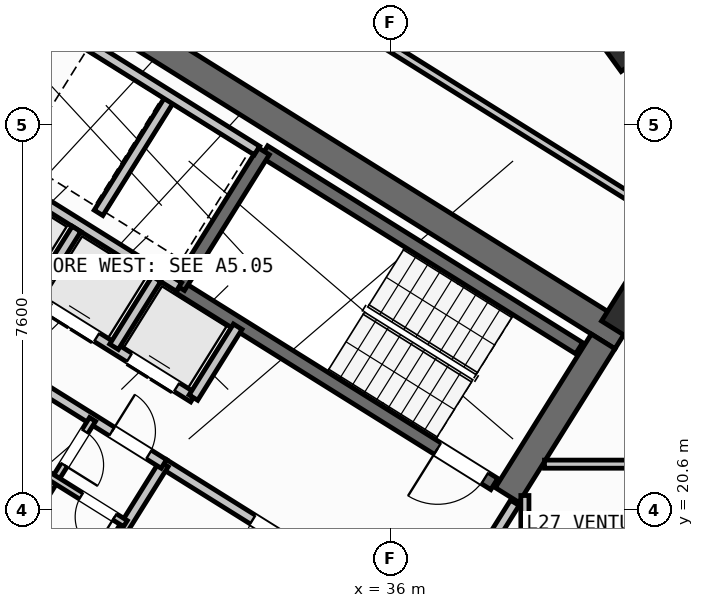
"""IFC4 building model, lengths in metres.
Left out: names, types, materials, properties, quantities, classifications, styles, units other than length and angle.
Written with IfcOpenShell. Run it as: python <this file> out.ifc"""

import sys

from ifc_helpers import new_model, si_unit, direction, frame, frame_2d, origin, origin_2d, place, context, subcontext, project, spatial, rectangle, hollow_rectangle, i_section, extrude, source, transform, mapped, element, fill, save


model = new_model("IFC4")
c1 = context("Model", 3, precision=1e-05, world=origin(), true_north=direction((0.0, 1.0)))
c2 = subcontext(c1, "Body", "Model", "MODEL_VIEW")
j1 = project(units=[si_unit("LENGTHUNIT", "METRE"), si_unit("PLANEANGLEUNIT", "RADIAN")], contexts=[c1])
p1 = place(None, origin())
s1 = spatial("IfcSite", under=j1, at=p1, CompositionType="ELEMENT")
p2 = place(p1, origin())
s2 = spatial("IfcBuilding", under=s1, at=p2, CompositionType="ELEMENT")
p3 = place(p2, frame((0.0, 0.0, 108.9)))
s3 = spatial("IfcBuildingStorey", under=s2, at=p3, CompositionType="ELEMENT", Elevation=108.9)
p4 = place(p3, frame((40.573, 24.01, 0.0), z_axis=(0.0, 0.0, 1.0), x_axis=(-0.848047359947, 0.529920442413, 0.0)))
e1 = element("IfcWall", 1, at=p4, inside=s3, PredefinedType="SHEAR", context=c2, shape_type="SweptSolid", body=[
    extrude(rectangle(XDim=13.14, YDim=0.55, at=frame_2d((6.57, 0.0))), origin(), (0.0, 0.0, 1.0), 3.35),
])
p5 = place(p3, frame((40.194, 23.922, 0.0), z_axis=(0.0, 0.0, 1.0), x_axis=(-0.529888438328, -0.848067357541, 0.0)))
e2 = element("IfcWall", 2, at=p5, inside=s3, PredefinedType="SHEAR", context=c2, shape_type="SweptSolid", body=[
    extrude(rectangle(XDim=3.575, YDim=0.55, at=frame_2d((1.788, 0.0))), origin(), (0.0, 0.0, 1.0), 3.35),
])
p6 = place(p3, frame((29.517, 30.594, 0.0), z_axis=(0.0, 0.0, 1.0), x_axis=(-0.529906864564, -0.848055844204, 0.0)))
e3 = element("IfcWall", 3, at=p6, inside=s3, PredefinedType="SHEAR", context=c2, shape_type="SweptSolid", body=[
    extrude(rectangle(XDim=3.575, YDim=0.55, at=frame_2d((1.788, 0.0))), origin(), (0.0, 0.0, 1.0), 3.35),
])
m1 = source(origin(), c2, "Body", "SweptSolid", [
    extrude(hollow_rectangle(XDim=0.9, YDim=0.9, WallThickness=0.036, at=origin_2d()), origin(), (0.0, 0.0, 1.0), 3.6),
])
p7 = place(p3, frame((40.783, 24.469, 0.0), z_axis=(0.0, 0.0, 1.0), x_axis=(-0.848048096156, 0.529919264233, 0.0)))
e4 = element("IfcColumn", 4, at=p7, inside=s3, PredefinedType="COLUMN", context=c2, shape_type="MappedRepresentation", body=[
    mapped(m1, transform((0.0, 0.0, 0.0), scale=1.0)),
])
m2 = source(origin(), c2, "Body", "SweptSolid", [
    extrude(i_section(OverallWidth=0.3, OverallDepth=0.65, WebThickness=0.016, FlangeThickness=0.031, at=origin_2d()), origin(), (0.0, 0.0, 1.0), 3.6),
])
p8 = place(p3, frame((40.479, 29.601, 0.0), z_axis=(0.0, 0.0, 1.0), x_axis=(0.809016994375, 0.587785252292, 0.0)))
e5 = element("IfcColumn", 5, at=p8, inside=s3, PredefinedType="COLUMN", context=c2, shape_type="MappedRepresentation", body=[
    mapped(m2, transform((0.0, 0.0, 0.0), scale=1.0)),
])
p9 = place(p3, frame((31.76, 12.183, 0.0), z_axis=(0.0, 0.0, 1.0), x_axis=(-0.848047074256, 0.529920899612, 0.0)))
e6 = element("IfcWall", 6, at=p9, inside=s3, PredefinedType="STANDARD", context=c2, shape_type="SweptSolid", body=[
    extrude(rectangle(XDim=30.652, YDim=0.32, at=frame_2d((15.326, 0.0))), origin(), (0.0, 0.0, 1.0), 3.35),
])
p10 = place(p9, frame((15.153, 0.0, 0.0)))
e7 = element("IfcOpeningElement", 7, at=p10, cuts=e6, PredefinedType="OPENING", context=c2, shape_type="SweptSolid", body=[
    extrude(rectangle(XDim=1.2, YDim=2.15, at=frame_2d((0.6, 1.075))), frame((0.0, 0.17, 0.0), z_axis=(0.0, -1.0, 0.0), x_axis=(1.0, 0.0, 0.0)), (0.0, 0.0, 1.0), 0.34),
])
p11 = place(p9, frame((2.002, 0.0, 0.8)))
e8 = element("IfcOpeningElement", 8, at=p11, cuts=e6, PredefinedType="OPENING", context=c2, shape_type="SweptSolid", body=[
    extrude(rectangle(XDim=2.1, YDim=1.55, at=frame_2d((1.05, 0.775))), frame((0.0, 0.17, 0.0), z_axis=(0.0, -1.0, 0.0), x_axis=(1.0, 0.0, 0.0)), (0.0, 0.0, 1.0), 0.34),
])
p12 = place(p9, frame((7.206, 0.0, 0.8)))
e9 = element("IfcOpeningElement", 9, at=p12, cuts=e6, PredefinedType="OPENING", context=c2, shape_type="SweptSolid", body=[
    extrude(rectangle(XDim=2.1, YDim=1.55, at=frame_2d((1.05, 0.775))), frame((0.0, 0.17, 0.0), z_axis=(0.0, -1.0, 0.0), x_axis=(1.0, 0.0, 0.0)), (0.0, 0.0, 1.0), 0.34),
])
p13 = place(p9, frame((12.648, 0.0, 1.0)))
e10 = element("IfcOpeningElement", 10, at=p13, cuts=e6, PredefinedType="OPENING", context=c2, shape_type="SweptSolid", body=[
    extrude(rectangle(XDim=0.9, YDim=1.25, at=frame_2d((0.45, 0.625))), frame((0.0, 0.17, 0.0), z_axis=(0.0, -1.0, 0.0), x_axis=(1.0, 0.0, 0.0)), (0.0, 0.0, 1.0), 0.34),
])
p14 = place(p9, frame((19.59, 0.0, 0.95)))
e11 = element("IfcOpeningElement", 11, at=p14, cuts=e6, PredefinedType="OPENING", context=c2, shape_type="SweptSolid", body=[
    extrude(rectangle(XDim=1.2, YDim=1.4, at=frame_2d((0.6, 0.7))), frame((0.0, 0.17, 0.0), z_axis=(0.0, -1.0, 0.0), x_axis=(1.0, 0.0, 0.0)), (0.0, 0.0, 1.0), 0.34),
])
p15 = place(p9, frame((25.966, 0.0, 1.0)))
e12 = element("IfcOpeningElement", 12, at=p15, cuts=e6, PredefinedType="OPENING", context=c2, shape_type="SweptSolid", body=[
    extrude(rectangle(XDim=0.9, YDim=1.25, at=frame_2d((0.45, 0.625))), frame((0.0, 0.17, 0.0), z_axis=(0.0, -1.0, 0.0), x_axis=(1.0, 0.0, 0.0)), (0.0, 0.0, 1.0), 0.34),
])
p16 = place(p9, frame((28.871, 0.0, 1.0)))
e13 = element("IfcOpeningElement", 13, at=p16, cuts=e6, PredefinedType="OPENING", context=c2, shape_type="SweptSolid", body=[
    extrude(rectangle(XDim=0.9, YDim=1.25, at=frame_2d((0.45, 0.625))), frame((0.0, 0.17, 0.0), z_axis=(0.0, -1.0, 0.0), x_axis=(1.0, 0.0, 0.0)), (0.0, 0.0, 1.0), 0.34),
])
p17 = place(p3, frame((31.28, 18.261, 0.0), z_axis=(0.0, 0.0, 1.0), x_axis=(-0.848051618787, 0.529913626805, 0.0)))
e14 = element("IfcWall", 14, at=p17, inside=s3, PredefinedType="SHEAR", context=c2, shape_type="SweptSolid", body=[
    extrude(rectangle(XDim=7.46, YDim=0.26, at=frame_2d((3.73, 0.0))), origin(), (0.0, 0.0, 1.0), 3.35),
])
p18 = place(p17, frame((0.36, 0.0, 0.0)))
e15 = element("IfcOpeningElement", 15, at=p18, cuts=e14, PredefinedType="OPENING", context=c2, shape_type="SweptSolid", body=[
    extrude(rectangle(XDim=0.86, YDim=2.05, at=frame_2d((0.43, 1.025))), frame((0.0, 0.14, 0.0), z_axis=(0.0, -1.0, 0.0), x_axis=(1.0, 0.0, 0.0)), (0.0, 0.0, 1.0), 0.28),
])
p19 = place(p3, frame((39.721, 23.788, 0.0), z_axis=(0.0, 0.0, 1.0), x_axis=(-0.848054434086, 0.529909121291, 0.0)))
e16 = element("IfcWall", 16, at=p19, inside=s3, PredefinedType="SHEAR", context=c2, shape_type="SweptSolid", body=[
    extrude(rectangle(XDim=7.33, YDim=0.26, at=frame_2d((3.665, 0.0))), origin(), (0.0, 0.0, 1.0), 3.35),
])
p20 = place(p3, frame((38.046, 21.108, 0.0), z_axis=(0.0, 0.0, 1.0), x_axis=(-0.848054434086, 0.529909121291, 0.0)))
e17 = element("IfcWall", 17, at=p20, inside=s3, PredefinedType="SHEAR", context=c2, shape_type="SweptSolid", body=[
    extrude(rectangle(XDim=7.33, YDim=0.26, at=frame_2d((3.665, 0.0))), origin(), (0.0, 0.0, 1.0), 3.35),
])
p21 = place(p20, frame((0.22, 0.0, 0.0)))
e18 = element("IfcOpeningElement", 18, at=p21, cuts=e17, PredefinedType="OPENING", context=c2, shape_type="SweptSolid", body=[
    extrude(rectangle(XDim=1.1, YDim=2.1, at=frame_2d((0.55, 1.05))), frame((0.0, 0.14, 0.0), z_axis=(0.0, -1.0, 0.0), x_axis=(1.0, 0.0, 0.0)), (0.0, 0.0, 1.0), 0.28),
])
p22 = place(p3, frame((33.496, 27.677, 0.0), z_axis=(0.0, 0.0, 1.0), x_axis=(-0.529908658664, -0.84805472316, 0.0)))
e19 = element("IfcWall", 19, at=p22, inside=s3, PredefinedType="SHEAR", context=c2, shape_type="SweptSolid", body=[
    extrude(rectangle(XDim=3.16, YDim=0.26, at=frame_2d((1.58, 0.0))), origin(), (0.0, 0.0, 1.0), 3.35),
])
p23 = place(p3, frame((36.417, 18.447, 0.0), z_axis=(0.0, 0.0, 1.0), x_axis=(-0.848064879198, 0.529892404805, 0.0)))
e20 = element("IfcWall", 20, at=p23, inside=s3, PredefinedType="STANDARD", context=c2, shape_type="SweptSolid", body=[
    extrude(rectangle(XDim=5.768, YDim=0.2, at=frame_2d((2.884, 0.0))), origin(), (0.0, 0.0, 1.0), 3.34),
])
p24 = place(p23, frame((2.548, 0.0, 0.0)))
e21 = element("IfcOpeningElement", 21, at=p24, cuts=e20, PredefinedType="OPENING", context=c2, shape_type="SweptSolid", body=[
    extrude(rectangle(XDim=1.15, YDim=2.1, at=frame_2d((0.575, 1.05))), frame((0.0, 0.11, 0.0), z_axis=(0.0, -1.0, 0.0), x_axis=(1.0, 0.0, 0.0)), (0.0, 0.0, 1.0), 0.22),
])
p25 = place(p3, frame((31.822, 24.998, 0.0), z_axis=(0.0, 0.0, 1.0), x_axis=(-0.848036912365, 0.52993716162, 0.0)))
e22 = element("IfcWall", 22, at=p25, inside=s3, PredefinedType="STANDARD", context=c2, shape_type="SweptSolid", body=[
    extrude(rectangle(XDim=4.618, YDim=0.2, at=frame_2d((2.309, 0.0))), origin(), (0.0, 0.0, 1.0), 3.34),
])
p26 = place(p3, frame((32.108, 22.814, 0.0), z_axis=(0.0, 0.0, 1.0), x_axis=(-0.848042229521, 0.529928652696, 0.0)))
e23 = element("IfcWall", 23, at=p26, inside=s3, PredefinedType="STANDARD", context=c2, shape_type="SweptSolid", body=[
    extrude(rectangle(XDim=5.62, YDim=0.2, at=frame_2d((2.81, 0.0))), origin(), (0.0, 0.0, 1.0), 3.34),
])
p27 = place(p26, frame((0.39, 0.0, 0.0)))
e24 = element("IfcOpeningElement", 24, at=p27, cuts=e23, PredefinedType="OPENING", context=c2, shape_type="SweptSolid", body=[
    extrude(rectangle(XDim=1.1, YDim=2.15, at=frame_2d((0.55, 1.075))), frame((0.0, 0.11, 0.0), z_axis=(0.0, -1.0, 0.0), x_axis=(1.0, 0.0, 0.0)), (0.0, 0.0, 1.0), 0.22),
])
p28 = place(p26, frame((2.25, 0.0, 0.0)))
e25 = element("IfcOpeningElement", 25, at=p28, cuts=e23, PredefinedType="OPENING", context=c2, shape_type="SweptSolid", body=[
    extrude(rectangle(XDim=1.1, YDim=2.15, at=frame_2d((0.55, 1.075))), frame((0.0, 0.11, 0.0), z_axis=(0.0, -1.0, 0.0), x_axis=(1.0, 0.0, 0.0)), (0.0, 0.0, 1.0), 0.22),
])
p29 = place(p26, frame((4.11, 0.0, 0.0)))
e26 = element("IfcOpeningElement", 26, at=p29, cuts=e23, PredefinedType="OPENING", context=c2, shape_type="SweptSolid", body=[
    extrude(rectangle(XDim=1.1, YDim=2.15, at=frame_2d((0.55, 1.075))), frame((0.0, 0.11, 0.0), z_axis=(0.0, -1.0, 0.0), x_axis=(1.0, 0.0, 0.0)), (0.0, 0.0, 1.0), 0.22),
])
p30 = place(p3, frame((32.982, 24.213, 0.0), z_axis=(0.0, 0.0, 1.0), x_axis=(-0.529839334948, -0.84809803628, 0.0)))
e27 = element("IfcWall", 27, at=p30, inside=s3, PredefinedType="STANDARD", context=c2, shape_type="SweptSolid", body=[
    extrude(rectangle(XDim=1.65, YDim=0.2, at=frame_2d((0.825, 0.0))), origin(), (0.0, 0.0, 1.0), 3.34),
])
p31 = place(p3, frame((31.645, 28.716, 0.0), z_axis=(0.0, 0.0, 1.0), x_axis=(-0.52986693015, -0.848080795876, 0.0)))
e28 = element("IfcWall", 28, at=p31, inside=s3, PredefinedType="STANDARD", context=c2, shape_type="SweptSolid", body=[
    extrude(rectangle(XDim=2.66, YDim=0.2, at=frame_2d((1.33, 0.0))), origin(), (0.0, 0.0, 1.0), 3.34),
])
p32 = place(p3, frame((33.363, 27.69, 0.0), z_axis=(0.0, 0.0, 1.0), x_axis=(-0.848047090064, 0.529920874315, 0.0)))
e29 = element("IfcWall", 29, at=p32, inside=s3, PredefinedType="STANDARD", context=c2, shape_type="SweptSolid", body=[
    extrude(rectangle(XDim=4.498, YDim=0.2, at=frame_2d((2.249, 0.0))), origin(), (0.0, 0.0, 1.0), 3.34),
])
for number, where, z_axis, x_axis in (
    (30, (31.379, 25.156, 0.0), (0.0, 0.0, 1.0), (-0.53, -0.848, 0.0)),
    (31, (29.801, 26.142, 0.0), (0.0, 0.0, 1.0), (-0.53, -0.848, 0.0)),
):
    element("IfcWall", number, at=place(p3, frame(where, z_axis=z_axis, x_axis=x_axis)), inside=s3, PredefinedType="STANDARD", context=c2, shape_type="SweptSolid", body=[
        extrude(rectangle(XDim=1.58, YDim=0.2, at=frame_2d((0.79, 0.0))), origin(), (0.0, 0.0, 1.0), 3.34),
    ])
p33 = place(p3, frame((31.525, 21.504, 0.0), z_axis=(0.0, 0.0, 1.0), x_axis=(-0.529907497854, -0.848055448493, 0.0)))
e32 = element("IfcWall", 32, at=p33, inside=s3, PredefinedType="STANDARD", context=c2, shape_type="SweptSolid", body=[
    extrude(rectangle(XDim=2.88, YDim=0.2, at=frame_2d((1.44, 0.0))), origin(), (0.0, 0.0, 1.0), 3.34),
])
p34 = place(p3, frame((31.525, 21.504, 0.0), z_axis=(0.0, 0.0, 1.0), x_axis=(-0.848040211232, 0.529931882541, 0.0)))
e33 = element("IfcWall", 33, at=p34, inside=s3, PredefinedType="STANDARD", context=c2, shape_type="SweptSolid", body=[
    extrude(rectangle(XDim=6.218, YDim=0.2, at=frame_2d((3.109, 0.0))), origin(), (0.0, 0.0, 1.0), 3.34),
])
p35 = place(p34, frame((4.4, 0.0, 0.0)))
e34 = element("IfcOpeningElement", 34, at=p35, cuts=e33, PredefinedType="OPENING", context=c2, shape_type="SweptSolid", body=[
    extrude(rectangle(XDim=0.86, YDim=2.05, at=frame_2d((0.43, 1.025))), frame((0.0, 0.11, 0.0), z_axis=(0.0, -1.0, 0.0), x_axis=(1.0, 0.0, 0.0)), (0.0, 0.0, 1.0), 0.22),
])
p36 = place(p34, frame((0.35, 0.0, 0.0)))
e35 = element("IfcOpeningElement", 35, at=p36, cuts=e33, PredefinedType="OPENING", context=c2, shape_type="SweptSolid", body=[
    extrude(rectangle(XDim=0.86, YDim=2.05, at=frame_2d((0.43, 1.025))), frame((0.0, 0.11, 0.0), z_axis=(0.0, -1.0, 0.0), x_axis=(1.0, 0.0, 0.0)), (0.0, 0.0, 1.0), 0.22),
])
p37 = place(p3, frame((30.117, 22.384, 0.0), z_axis=(0.0, 0.0, 1.0), x_axis=(-0.529951914384, -0.848027693204, 0.0)))
e36 = element("IfcWall", 36, at=p37, inside=s3, PredefinedType="PLUMBINGWALL", context=c2, shape_type="SweptSolid", body=[
    extrude(rectangle(XDim=1.4, YDim=0.14, at=frame_2d((0.7, 0.0))), origin(), (0.0, 0.0, 1.0), 3.34),
])
p38 = place(p37, frame((0.28, 0.0, 0.0)))
e37 = element("IfcOpeningElement", 37, at=p38, cuts=e36, PredefinedType="OPENING", context=c2, shape_type="SweptSolid", body=[
    extrude(rectangle(XDim=0.78, YDim=2.05, at=frame_2d((0.39, 1.025))), frame((0.0, 0.08, 0.0), z_axis=(0.0, -1.0, 0.0), x_axis=(1.0, 0.0, 0.0)), (0.0, 0.0, 1.0), 0.16),
])
p39 = place(p3, frame((29.375, 21.196, 0.0), z_axis=(0.0, 0.0, 1.0), x_axis=(-0.529865479138, -0.848081702443, 0.0)))
e38 = element("IfcWall", 38, at=p39, inside=s3, PredefinedType="PLUMBINGWALL", context=c2, shape_type="SweptSolid", body=[
    extrude(rectangle(XDim=1.48, YDim=0.14, at=frame_2d((0.74, 0.0))), origin(), (0.0, 0.0, 1.0), 3.34),
])
p40 = place(p3, frame((30.766, 20.327, 0.0), z_axis=(0.0, 0.0, 1.0), x_axis=(-0.848052663127, 0.529911955482, 0.0)))
e39 = element("IfcWall", 39, at=p40, inside=s3, PredefinedType="PLUMBINGWALL", context=c2, shape_type="SweptSolid", body=[
    extrude(rectangle(XDim=3.28, YDim=0.14, at=frame_2d((1.64, 0.0))), origin(), (0.0, 0.0, 1.0), 3.34),
])
p41 = place(p40, frame((0.25, 0.0, 0.0)))
e40 = element("IfcOpeningElement", 40, at=p41, cuts=e39, PredefinedType="OPENING", context=c2, shape_type="SweptSolid", body=[
    extrude(rectangle(XDim=0.78, YDim=2.05, at=frame_2d((0.39, 1.025))), frame((0.0, 0.08, 0.0), z_axis=(0.0, -1.0, 0.0), x_axis=(1.0, 0.0, 0.0)), (0.0, 0.0, 1.0), 0.16),
])
p42 = place(p40, frame((1.92, 0.0, 0.0)))
e41 = element("IfcOpeningElement", 41, at=p42, cuts=e39, PredefinedType="OPENING", context=c2, shape_type="SweptSolid", body=[
    extrude(rectangle(XDim=0.78, YDim=2.05, at=frame_2d((0.39, 1.025))), frame((0.0, 0.08, 0.0), z_axis=(0.0, -1.0, 0.0), x_axis=(1.0, 0.0, 0.0)), (0.0, 0.0, 1.0), 0.16),
])
p43 = place(p3, frame((31.239, 38.274, 0.0), z_axis=(0.0, 0.0, 1.0), x_axis=(-0.529925472745, -0.848044216616, 0.0)))
e42 = element("IfcWall", 42, at=p43, inside=s3, PredefinedType="PARTITIONING", context=c2, shape_type="SweptSolid", body=[
    extrude(rectangle(XDim=11.65, YDim=0.16, at=frame_2d((5.825, 0.0))), origin(), (0.0, 0.0, 1.0), 3.34),
])
p44 = place(p3, frame((41.936, 26.012, 0.0), z_axis=(0.0, 0.0, 1.0), x_axis=(-0.848051154596, 0.529914369676, 0.0)))
e43 = element("IfcWall", 43, at=p44, inside=s3, PredefinedType="PARTITIONING", context=c2, shape_type="SweptSolid", body=[
    extrude(rectangle(XDim=15.57, YDim=0.16, at=frame_2d((7.785, 0.0))), origin(), (0.0, 0.0, 1.0), 3.34),
])
p45 = place(p44, frame((10.83, 0.0, 0.0)))
e44 = element("IfcOpeningElement", 44, at=p45, cuts=e43, PredefinedType="OPENING", context=c2, shape_type="SweptSolid", body=[
    extrude(rectangle(XDim=1.0, YDim=2.1, at=frame_2d((0.5, 1.05))), frame((0.0, 0.09, 0.0), z_axis=(0.0, -1.0, 0.0), x_axis=(1.0, 0.0, 0.0)), (0.0, 0.0, 1.0), 0.18),
])
p46 = place(p3, frame((42.226, 28.873, 0.0), z_axis=(0.0, 0.0, 1.0), x_axis=(-0.848049134363, 0.529917602752, 0.0)))
e45 = element("IfcWall", 45, at=p46, inside=s3, PredefinedType="PLUMBINGWALL", context=c2, shape_type="SweptSolid", body=[
    extrude(rectangle(XDim=14.3, YDim=0.14, at=frame_2d((7.15, 0.0))), origin(), (0.0, 0.0, 1.0), 3.34),
])
p47 = place(p46, frame((9.57, 0.0, 0.0)))
e46 = element("IfcOpeningElement", 46, at=p47, cuts=e45, PredefinedType="OPENING", context=c2, shape_type="SweptSolid", body=[
    extrude(rectangle(XDim=0.92, YDim=2.08, at=frame_2d((0.46, 1.04))), frame((0.0, 0.08, 0.0), z_axis=(0.0, -1.0, 0.0), x_axis=(1.0, 0.0, 0.0)), (0.0, 0.0, 1.0), 0.16),
])
p48 = place(p3, frame((38.451, 20.737, 0.0), z_axis=(0.0, 0.0, 1.0), x_axis=(-0.529924799939, -0.848044637038, 0.0)))
e47 = element("IfcWall", 47, at=p48, inside=s3, PredefinedType="STANDARD", context=c2, shape_type="SweptSolid", body=[
    extrude(rectangle(XDim=2.96, YDim=0.2, at=frame_2d((1.48, 0.0))), origin(), (0.0, 0.0, 1.0), 3.34),
])
p49 = place(p48, frame((1.46, 0.0, 0.0)))
e48 = element("IfcOpeningElement", 48, at=p49, cuts=e47, PredefinedType="OPENING", context=c2, shape_type="SweptSolid", body=[
    extrude(rectangle(XDim=0.86, YDim=2.05, at=frame_2d((0.43, 1.025))), frame((0.0, 0.11, 0.0), z_axis=(0.0, -1.0, 0.0), x_axis=(1.0, 0.0, 0.0)), (0.0, 0.0, 1.0), 0.22),
])
p50 = place(p3, frame((38.65, 17.93, 0.0), z_axis=(0.0, 0.0, 1.0), x_axis=(0.0, 1.0, 0.0)))
e49 = element("IfcWall", 49, at=p50, inside=s3, PredefinedType="PARTITIONING", context=c2, shape_type="SweptSolid", body=[
    extrude(rectangle(XDim=2.951, YDim=0.16, at=frame_2d((1.476, 0.0))), origin(), (0.0, 0.0, 1.0), 3.34),
])
p51 = place(p3, frame((39.037, 21.5, 0.0), z_axis=(0.0, 0.0, 1.0), x_axis=(1.0, 0.0, 0.0)))
e50 = element("IfcWall", 50, at=p51, inside=s3, PredefinedType="PARTITIONING", context=c2, shape_type="SweptSolid", body=[
    extrude(rectangle(XDim=7.215, YDim=0.16, at=frame_2d((3.607, 0.0))), origin(), (0.0, 0.0, 1.0), 3.34),
])
m3 = source(origin(), c2, "Body", "SweptSolid", [
    extrude(rectangle(XDim=1.1, YDim=2.1, at=frame_2d((0.55, 1.05))), frame((0.0, 0.025, 0.0), z_axis=(0.0, -1.0, 0.0), x_axis=(1.0, 0.0, 0.0)), (0.0, 0.0, 1.0), 0.05),
])
p52 = place(p21, origin())
e51 = element("IfcDoor", 51, at=p52, inside=s3, OperationType="SINGLE_SWING_RIGHT", PredefinedType="DOOR", context=c2, shape_type="MappedRepresentation", body=[
    mapped(m3, transform((0.0, 0.0, 0.0), scale=1.0)),
])
fill(e18, e51)
m4 = source(origin(), c2, "Body", "SweptSolid", [
    extrude(rectangle(XDim=1.15, YDim=2.1, at=frame_2d((0.575, 1.05))), frame((0.0, 0.025, 0.0), z_axis=(0.0, -1.0, 0.0), x_axis=(1.0, 0.0, 0.0)), (0.0, 0.0, 1.0), 0.05),
])
p53 = place(p24, origin())
e52 = element("IfcDoor", 52, at=p53, inside=s3, OperationType="SINGLE_SWING_LEFT", PredefinedType="DOOR", context=c2, shape_type="MappedRepresentation", body=[
    mapped(m4, transform((0.0, 0.0, 0.0), scale=1.0)),
])
fill(e21, e52)
m5 = source(origin(), c2, "Body", "SweptSolid", [
    extrude(rectangle(XDim=1.1, YDim=2.15, at=frame_2d((0.55, 1.075))), frame((0.0, 0.025, 0.0), z_axis=(0.0, -1.0, 0.0), x_axis=(1.0, 0.0, 0.0)), (0.0, 0.0, 1.0), 0.05),
])
p54 = place(p27, origin())
e53 = element("IfcDoor", 53, at=p54, inside=s3, OperationType="DOUBLE_DOOR_SLIDING", PredefinedType="DOOR", context=c2, shape_type="MappedRepresentation", body=[
    mapped(m5, transform((0.0, 0.0, 0.0), scale=1.0)),
])
fill(e24, e53)
p55 = place(p28, origin())
e54 = element("IfcDoor", 54, at=p55, inside=s3, OperationType="DOUBLE_DOOR_SLIDING", PredefinedType="DOOR", context=c2, shape_type="MappedRepresentation", body=[
    mapped(m5, transform((0.0, 0.0, 0.0), scale=1.0)),
])
fill(e25, e54)
m6 = source(origin(), c2, "Body", "SweptSolid", [
    extrude(rectangle(XDim=0.86, YDim=2.05, at=frame_2d((0.43, 1.025))), frame((0.0, 0.025, 0.0), z_axis=(0.0, -1.0, 0.0), x_axis=(1.0, 0.0, 0.0)), (0.0, 0.0, 1.0), 0.05),
])
p56 = place(p36, frame((0.86, 0.0, 0.0), z_axis=(0.0, 0.0, 1.0), x_axis=(-1.0, 0.0, 0.0)))
e55 = element("IfcDoor", 55, at=p56, inside=s3, OperationType="SINGLE_SWING_LEFT", PredefinedType="DOOR", context=c2, shape_type="MappedRepresentation", body=[
    mapped(m6, transform((0.0, 0.0, 0.0), scale=1.0)),
])
fill(e35, e55)
m7 = source(origin(), c2, "Body", "SweptSolid", [
    extrude(rectangle(XDim=0.78, YDim=2.05, at=frame_2d((0.39, 1.025))), frame((0.0, 0.025, 0.0), z_axis=(0.0, -1.0, 0.0), x_axis=(1.0, 0.0, 0.0)), (0.0, 0.0, 1.0), 0.05),
])
p57 = place(p38, origin())
e56 = element("IfcDoor", 56, at=p57, inside=s3, OperationType="SINGLE_SWING_RIGHT", PredefinedType="DOOR", context=c2, shape_type="MappedRepresentation", body=[
    mapped(m7, transform((0.0, 0.0, 0.0), scale=1.0)),
])
fill(e37, e56)
p58 = place(p41, origin())
e57 = element("IfcDoor", 57, at=p58, inside=s3, OperationType="SINGLE_SWING_LEFT", PredefinedType="DOOR", context=c2, shape_type="MappedRepresentation", body=[
    mapped(m7, transform((0.0, 0.0, 0.0), scale=1.0)),
])
fill(e40, e57)
save(model, sys.argv[1])
